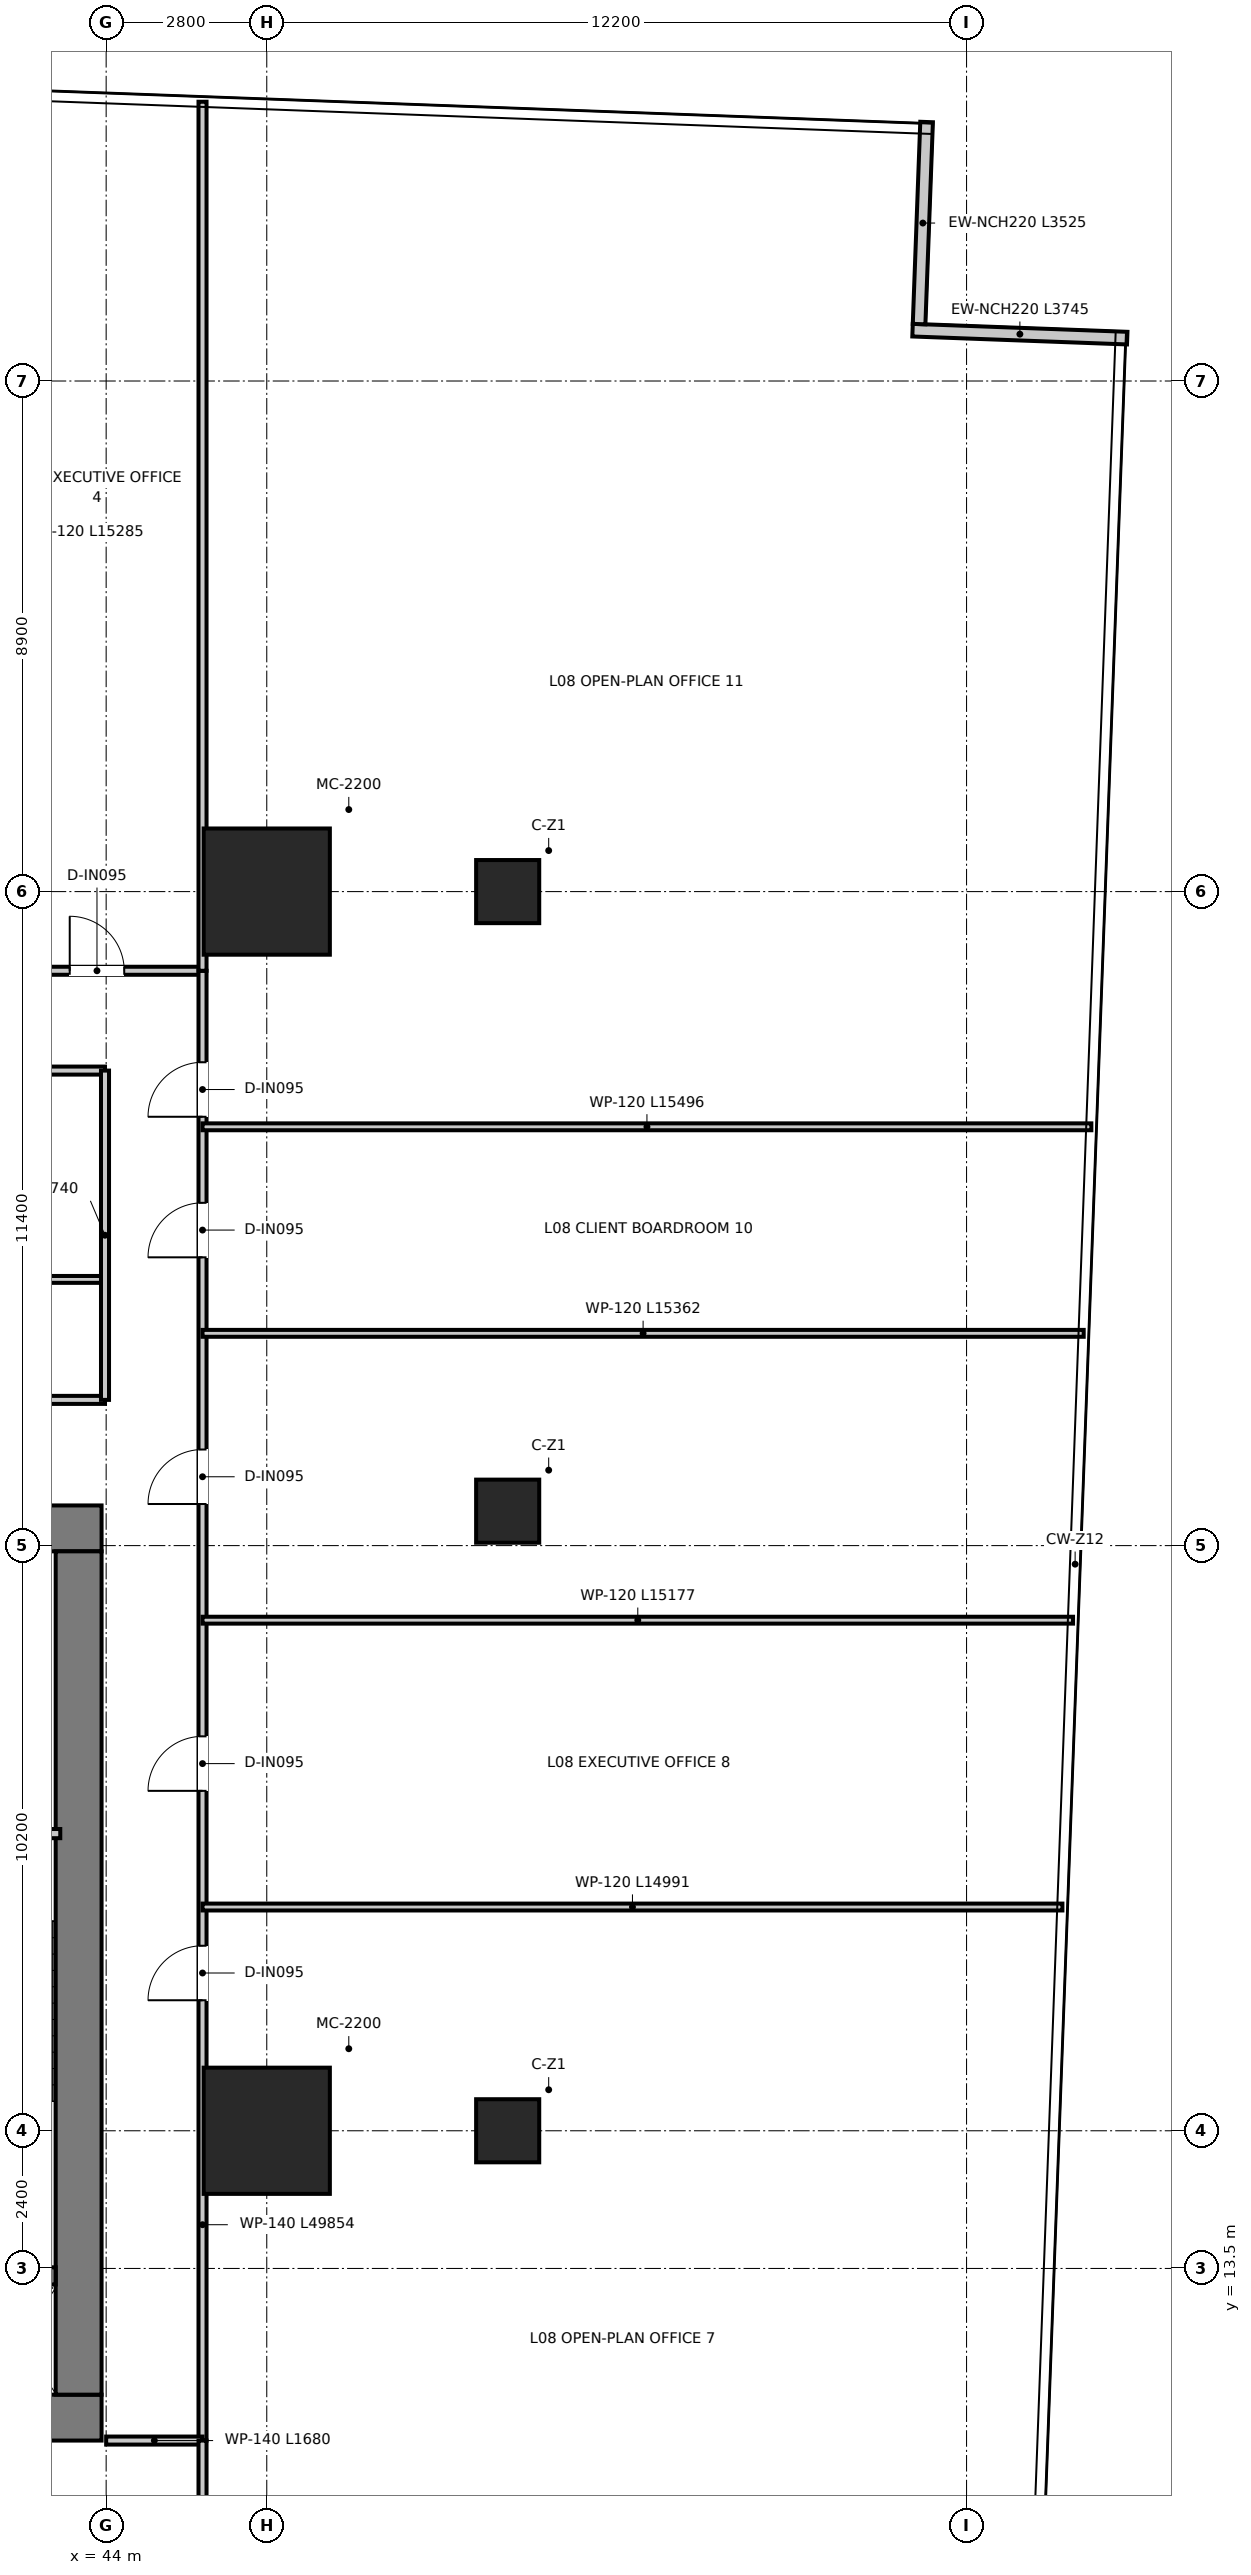
"""IFC4 building model, lengths in metres.
Left out: names, types, materials, properties, quantities, classifications, styles, units other than length and angle.
Written with IfcOpenShell. Run it as: python <this file> out.ifc"""

import sys

from ifc_helpers import new_model, si_unit, direction, frame, frame_2d, origin, origin_2d, place, context, subcontext, project, spatial, rectangle, extrude, source, transform, mapped, element, fill, save


model = new_model("IFC4")
c1 = context("Model", 3, precision=1e-05, world=origin(), true_north=direction((0.0, 1.0)))
c2 = subcontext(c1, "Body", "Model", "MODEL_VIEW")
j1 = project(units=[si_unit("LENGTHUNIT", "METRE"), si_unit("PLANEANGLEUNIT", "RADIAN")], contexts=[c1])
p1 = place(None, origin())
s1 = spatial("IfcSite", under=j1, at=p1, CompositionType="ELEMENT")
p2 = place(p1, origin())
s2 = spatial("IfcBuilding", under=s1, at=p2, CompositionType="ELEMENT")
p3 = place(p2, frame((0.0, 0.0, 36.85)))
s3 = spatial("IfcBuildingStorey", under=s2, at=p3, CompositionType="ELEMENT", Elevation=36.85)
p4 = place(p3, frame((28.08, 10.9, 0.0), z_axis=(0.0, 0.0, 1.0), x_axis=(1.0, 0.0, 0.0)))
e1 = element("IfcWall", 1, at=p4, inside=s3, PredefinedType="SHEAR", context=c2, shape_type="SweptSolid", body=[
    extrude(rectangle(XDim=15.84, YDim=0.8, at=frame_2d((7.92, 0.0))), origin(), (0.0, 0.0, 1.0), 3.95),
])
p5 = place(p3, frame((28.08, 26.4, 0.0), z_axis=(0.0, 0.0, 1.0), x_axis=(1.0, 0.0, 0.0)))
e2 = element("IfcWall", 2, at=p5, inside=s3, PredefinedType="SHEAR", context=c2, shape_type="SweptSolid", body=[
    extrude(rectangle(XDim=15.84, YDim=0.8, at=frame_2d((7.92, 0.0))), origin(), (0.0, 0.0, 1.0), 3.95),
])
p6 = place(p5, frame((7.22, 0.0, 0.0)))
e3 = element("IfcOpeningElement", 3, at=p6, cuts=e2, PredefinedType="OPENING", context=c2, shape_type="SweptSolid", body=[
    extrude(rectangle(XDim=1.4, YDim=2.2, at=frame_2d((0.7, 1.1))), frame((0.0, 0.41, 0.0), z_axis=(0.0, -1.0, 0.0), x_axis=(1.0, 0.0, 0.0)), (0.0, 0.0, 1.0), 0.82),
])
p7 = place(p5, frame((1.775, 0.0, 0.0)))
e4 = element("IfcOpeningElement", 4, at=p7, cuts=e2, PredefinedType="OPENING", context=c2, shape_type="SweptSolid", body=[
    extrude(rectangle(XDim=1.05, YDim=2.1, at=frame_2d((0.525, 1.05))), frame((0.0, 0.41, 0.0), z_axis=(0.0, -1.0, 0.0), x_axis=(1.0, 0.0, 0.0)), (0.0, 0.0, 1.0), 0.82),
])
p8 = place(p5, frame((13.015, 0.0, 0.0)))
e5 = element("IfcOpeningElement", 5, at=p8, cuts=e2, PredefinedType="OPENING", context=c2, shape_type="SweptSolid", body=[
    extrude(rectangle(XDim=1.05, YDim=2.1, at=frame_2d((0.525, 1.05))), frame((0.0, 0.41, 0.0), z_axis=(0.0, -1.0, 0.0), x_axis=(1.0, 0.0, 0.0)), (0.0, 0.0, 1.0), 0.82),
])
p9 = place(p3, frame((43.52, 11.3, 0.0), z_axis=(0.0, 0.0, 1.0), x_axis=(0.0, 1.0, 0.0)))
e6 = element("IfcWall", 6, at=p9, inside=s3, PredefinedType="SHEAR", context=c2, shape_type="SweptSolid", body=[
    extrude(rectangle(XDim=14.7, YDim=0.8, at=frame_2d((7.35, 0.0))), origin(), (0.0, 0.0, 1.0), 3.95),
])
p10 = place(p3, frame((40.02, 13.37, 0.0), z_axis=(0.0, 0.0, 1.0), x_axis=(1.0, 0.0, 0.0)))
e7 = element("IfcWall", 7, at=p10, inside=s3, PredefinedType="SHEAR", context=c2, shape_type="SweptSolid", body=[
    extrude(rectangle(XDim=3.1, YDim=0.3, at=frame_2d((1.55, 0.0))), origin(), (0.0, 0.0, 1.0), 3.95),
])
m1 = source(origin(), c2, "Body", "SweptSolid", [
    extrude(rectangle(XDim=2.2, YDim=2.2, at=origin_2d()), origin(), (0.0, 0.0, 1.0), 3.95),
])
for number, where, z_axis, x_axis in (
    (8, (46.8, 15.9, 0.0), (0.0, 0.0, 1.0), (1.0, 0.0, 0.0)),
    (9, (46.8, 37.5, 0.0), (0.0, 0.0, 1.0), (1.0, 0.0, 0.0)),
):
    element("IfcColumn", number, at=place(p3, frame(where, z_axis=z_axis, x_axis=x_axis)), inside=s3, PredefinedType="USERDEFINED", context=c2, shape_type="MappedRepresentation", body=[
        mapped(m1, transform((0.0, 0.0, 0.0), x_axis=(1.0, 0.0, 0.0), y_axis=(0.0, 1.0, 0.0), z_axis=(0.0, 0.0, 1.0), scale=1.0)),
    ])
m2 = source(origin(), c2, "Body", "SweptSolid", [
    extrude(rectangle(XDim=1.1, YDim=1.1, at=origin_2d()), origin(), (0.0, 0.0, 1.0), 3.95),
])
for number, where, z_axis, x_axis in (
    (10, (51.0, 37.5, 0.0), (0.0, 0.0, 1.0), (1.0, 0.0, 0.0)),
    (11, (51.0, 26.7, 0.0), (0.0, 0.0, 1.0), (1.0, 0.0, 0.0)),
    (12, (51.0, 15.9, 0.0), (0.0, 0.0, 1.0), (1.0, 0.0, 0.0)),
):
    element("IfcColumn", number, at=place(p3, frame(where, z_axis=z_axis, x_axis=x_axis)), inside=s3, PredefinedType="COLUMN", context=c2, shape_type="MappedRepresentation", body=[
        mapped(m2, transform((0.0, 0.0, 0.0), x_axis=(1.0, 0.0, 0.0), y_axis=(0.0, 1.0, 0.0), z_axis=(0.0, 0.0, 1.0), scale=1.0)),
    ])
p11 = place(p3, frame((61.801, 47.147, 0.0), z_axis=(0.0, 0.0, 1.0), x_axis=(-0.999314208504, 0.037028538746, 0.0)))
e13 = element("IfcWall", 13, at=p11, inside=s3, PredefinedType="ELEMENTEDWALL", context=c2, shape_type="SweptSolid", body=[
    extrude(rectangle(XDim=3.745, YDim=0.22, at=frame_2d((1.873, 0.0))), origin(), (0.0, 0.0, 1.0), 3.67),
])
p12 = place(p3, frame((58.173, 47.392, 0.0), z_axis=(0.0, 0.0, 1.0), x_axis=(0.03705521019, 0.999313219865, 0.0)))
e14 = element("IfcWall", 14, at=p12, inside=s3, PredefinedType="ELEMENTEDWALL", context=c2, shape_type="SweptSolid", body=[
    extrude(rectangle(XDim=3.525, YDim=0.22, at=frame_2d((1.762, 0.0))), origin(), (0.0, 0.0, 1.0), 3.67),
])
p13 = place(p3, frame((40.04, 21.08, 0.0), z_axis=(0.0, 0.0, 1.0), x_axis=(1.0, 0.0, 0.0)))
e15 = element("IfcWall", 15, at=p13, inside=s3, PredefinedType="PARTITIONING", context=c2, shape_type="SweptSolid", body=[
    extrude(rectangle(XDim=3.16, YDim=0.16, at=frame_2d((1.58, 0.0))), origin(), (0.0, 0.0, 1.0), 3.67),
])
p14 = place(p13, frame((1.055, 0.0, 0.0)))
e16 = element("IfcOpeningElement", 16, at=p14, cuts=e15, PredefinedType="OPENING", context=c2, shape_type="SweptSolid", body=[
    extrude(rectangle(XDim=1.05, YDim=2.1, at=frame_2d((0.525, 1.05))), frame((0.0, 0.09, 0.0), z_axis=(0.0, -1.0, 0.0), x_axis=(1.0, 0.0, 0.0)), (0.0, 0.0, 1.0), 0.18),
])
p15 = place(p3, frame((28.02, 28.64, 0.0), z_axis=(0.0, 0.0, 1.0), x_axis=(1.0, 0.0, 0.0)))
e17 = element("IfcWall", 17, at=p15, inside=s3, PredefinedType="PARTITIONING", context=c2, shape_type="SweptSolid", body=[
    extrude(rectangle(XDim=15.96, YDim=0.14, at=frame_2d((7.98, 0.0))), origin(), (0.0, 0.0, 1.0), 3.08),
])
p16 = place(p15, frame((7.455, 0.0, 0.0)))
e18 = element("IfcOpeningElement", 18, at=p16, cuts=e17, PredefinedType="OPENING", context=c2, shape_type="SweptSolid", body=[
    extrude(rectangle(XDim=1.05, YDim=2.15, at=frame_2d((0.525, 1.075))), frame((0.0, 0.08, 0.0), z_axis=(0.0, -1.0, 0.0), x_axis=(1.0, 0.0, 0.0)), (0.0, 0.0, 1.0), 0.16),
])
p17 = place(p3, frame((28.02, 30.74, 0.0), z_axis=(0.0, 0.0, 1.0), x_axis=(1.0, 0.0, 0.0)))
e19 = element("IfcWall", 19, at=p17, inside=s3, PredefinedType="PARTITIONING", context=c2, shape_type="SweptSolid", body=[
    extrude(rectangle(XDim=15.96, YDim=0.12, at=frame_2d((7.98, 0.0))), origin(), (0.0, 0.0, 1.0), 3.08),
])
p18 = place(p3, frame((28.02, 34.38, 0.0), z_axis=(0.0, 0.0, 1.0), x_axis=(1.0, 0.0, 0.0)))
e20 = element("IfcWall", 20, at=p18, inside=s3, PredefinedType="PARTITIONING", context=c2, shape_type="SweptSolid", body=[
    extrude(rectangle(XDim=15.96, YDim=0.14, at=frame_2d((7.98, 0.0))), origin(), (0.0, 0.0, 1.0), 3.08),
])
p19 = place(p18, frame((7.83, 0.0, 0.0)))
e21 = element("IfcOpeningElement", 21, at=p19, cuts=e20, PredefinedType="OPENING", context=c2, shape_type="SweptSolid", body=[
    extrude(rectangle(XDim=0.9, YDim=2.1, at=frame_2d((0.45, 1.05))), frame((0.0, 0.08, 0.0), z_axis=(0.0, -1.0, 0.0), x_axis=(1.0, 0.0, 0.0)), (0.0, 0.0, 1.0), 0.16),
])
p20 = place(p18, frame((11.03, 0.0, 0.0)))
e22 = element("IfcOpeningElement", 22, at=p20, cuts=e20, PredefinedType="OPENING", context=c2, shape_type="SweptSolid", body=[
    extrude(rectangle(XDim=0.9, YDim=2.1, at=frame_2d((0.45, 1.05))), frame((0.0, 0.08, 0.0), z_axis=(0.0, -1.0, 0.0), x_axis=(1.0, 0.0, 0.0)), (0.0, 0.0, 1.0), 0.16),
])
p21 = place(p18, frame((14.055, 0.0, 0.0)))
e23 = element("IfcOpeningElement", 23, at=p21, cuts=e20, PredefinedType="OPENING", context=c2, shape_type="SweptSolid", body=[
    extrude(rectangle(XDim=0.95, YDim=2.1, at=frame_2d((0.475, 1.05))), frame((0.0, 0.08, 0.0), z_axis=(0.0, -1.0, 0.0), x_axis=(1.0, 0.0, 0.0)), (0.0, 0.0, 1.0), 0.16),
])
p22 = place(p18, frame((2.855, 0.0, 0.0)))
e24 = element("IfcOpeningElement", 24, at=p22, cuts=e20, PredefinedType="OPENING", context=c2, shape_type="SweptSolid", body=[
    extrude(rectangle(XDim=0.95, YDim=2.1, at=frame_2d((0.475, 1.05))), frame((0.0, 0.08, 0.0), z_axis=(0.0, -1.0, 0.0), x_axis=(1.0, 0.0, 0.0)), (0.0, 0.0, 1.0), 0.16),
])
p23 = place(p3, frame((43.98, 28.64, 0.0), z_axis=(0.0, 0.0, 1.0), x_axis=(0.0, 1.0, 0.0)))
e25 = element("IfcWall", 25, at=p23, inside=s3, PredefinedType="PARTITIONING", context=c2, shape_type="SweptSolid", body=[
    extrude(rectangle(XDim=5.74, YDim=0.14, at=frame_2d((2.87, 0.0))), origin(), (0.0, 0.0, 1.0), 3.22),
])
p24 = place(p3, frame((26.32, 36.12, 0.0), z_axis=(0.0, 0.0, 1.0), x_axis=(1.0, 0.0, 0.0)))
e26 = element("IfcWall", 26, at=p24, inside=s3, PredefinedType="PARTITIONING", context=c2, shape_type="SweptSolid", body=[
    extrude(rectangle(XDim=19.36, YDim=0.14, at=frame_2d((9.68, 0.0))), origin(), (0.0, 0.0, 1.0), 3.08),
])
p25 = place(p24, frame((1.365, 0.0, 0.0)))
e27 = element("IfcOpeningElement", 27, at=p25, cuts=e26, PredefinedType="OPENING", context=c2, shape_type="SweptSolid", body=[
    extrude(rectangle(XDim=0.95, YDim=2.1, at=frame_2d((0.475, 1.05))), frame((0.0, 0.08, 0.0), z_axis=(0.0, -1.0, 0.0), x_axis=(1.0, 0.0, 0.0)), (0.0, 0.0, 1.0), 0.16),
])
p26 = place(p24, frame((6.205, 0.0, 0.0)))
e28 = element("IfcOpeningElement", 28, at=p26, cuts=e26, PredefinedType="OPENING", context=c2, shape_type="SweptSolid", body=[
    extrude(rectangle(XDim=0.95, YDim=2.1, at=frame_2d((0.475, 1.05))), frame((0.0, 0.08, 0.0), z_axis=(0.0, -1.0, 0.0), x_axis=(1.0, 0.0, 0.0)), (0.0, 0.0, 1.0), 0.16),
])
p27 = place(p24, frame((12.205, 0.0, 0.0)))
e29 = element("IfcOpeningElement", 29, at=p27, cuts=e26, PredefinedType="OPENING", context=c2, shape_type="SweptSolid", body=[
    extrude(rectangle(XDim=0.95, YDim=2.1, at=frame_2d((0.475, 1.05))), frame((0.0, 0.08, 0.0), z_axis=(0.0, -1.0, 0.0), x_axis=(1.0, 0.0, 0.0)), (0.0, 0.0, 1.0), 0.16),
])
p28 = place(p24, frame((17.045, 0.0, 0.0)))
e30 = element("IfcOpeningElement", 30, at=p28, cuts=e26, PredefinedType="OPENING", context=c2, shape_type="SweptSolid", body=[
    extrude(rectangle(XDim=0.95, YDim=2.1, at=frame_2d((0.475, 1.05))), frame((0.0, 0.08, 0.0), z_axis=(0.0, -1.0, 0.0), x_axis=(1.0, 0.0, 0.0)), (0.0, 0.0, 1.0), 0.16),
])
p29 = place(p3, frame((45.68, 10.5, 0.0), z_axis=(0.0, 0.0, 1.0), x_axis=(0.0, 1.0, 0.0)))
e31 = element("IfcWall", 31, at=p29, inside=s3, PredefinedType="PARTITIONING", context=c2, shape_type="SweptSolid", body=[
    extrude(rectangle(XDim=25.62, YDim=0.14, at=frame_2d((12.81, 0.0))), origin(), (0.0, 0.0, 1.0), 2.97),
])
p30 = place(p29, frame((7.675, 0.0, 0.0)))
e32 = element("IfcOpeningElement", 32, at=p30, cuts=e31, PredefinedType="OPENING", context=c2, shape_type="SweptSolid", body=[
    extrude(rectangle(XDim=0.95, YDim=2.1, at=frame_2d((0.475, 1.05))), frame((0.0, 0.08, 0.0), z_axis=(0.0, -1.0, 0.0), x_axis=(1.0, 0.0, 0.0)), (0.0, 0.0, 1.0), 0.16),
])
p31 = place(p29, frame((11.325, 0.0, 0.0)))
e33 = element("IfcOpeningElement", 33, at=p31, cuts=e31, PredefinedType="OPENING", context=c2, shape_type="SweptSolid", body=[
    extrude(rectangle(XDim=0.95, YDim=2.1, at=frame_2d((0.475, 1.05))), frame((0.0, 0.08, 0.0), z_axis=(0.0, -1.0, 0.0), x_axis=(1.0, 0.0, 0.0)), (0.0, 0.0, 1.0), 0.16),
])
p32 = place(p29, frame((16.325, 0.0, 0.0)))
e34 = element("IfcOpeningElement", 34, at=p32, cuts=e31, PredefinedType="OPENING", context=c2, shape_type="SweptSolid", body=[
    extrude(rectangle(XDim=0.95, YDim=2.1, at=frame_2d((0.475, 1.05))), frame((0.0, 0.08, 0.0), z_axis=(0.0, -1.0, 0.0), x_axis=(1.0, 0.0, 0.0)), (0.0, 0.0, 1.0), 0.16),
])
p33 = place(p29, frame((20.625, 0.0, 0.0)))
e35 = element("IfcOpeningElement", 35, at=p33, cuts=e31, PredefinedType="OPENING", context=c2, shape_type="SweptSolid", body=[
    extrude(rectangle(XDim=0.95, YDim=2.1, at=frame_2d((0.475, 1.05))), frame((0.0, 0.08, 0.0), z_axis=(0.0, -1.0, 0.0), x_axis=(1.0, 0.0, 0.0)), (0.0, 0.0, 1.0), 0.16),
])
p34 = place(p29, frame((23.075, 0.0, 0.0)))
e36 = element("IfcOpeningElement", 36, at=p34, cuts=e31, PredefinedType="OPENING", context=c2, shape_type="SweptSolid", body=[
    extrude(rectangle(XDim=0.95, YDim=2.1, at=frame_2d((0.475, 1.05))), frame((0.0, 0.08, 0.0), z_axis=(0.0, -1.0, 0.0), x_axis=(1.0, 0.0, 0.0)), (0.0, 0.0, 1.0), 0.16),
])
p35 = place(p3, frame((44.0, 10.5, 0.0), z_axis=(0.0, 0.0, 1.0), x_axis=(1.0, 0.0, 0.0)))
e37 = element("IfcWall", 37, at=p35, inside=s3, PredefinedType="PARTITIONING", context=c2, shape_type="SweptSolid", body=[
    extrude(rectangle(XDim=1.68, YDim=0.14, at=frame_2d((0.84, 0.0))), origin(), (0.0, 0.0, 1.0), 3.67),
])
p36 = place(p3, frame((45.68, 36.12, 0.0), z_axis=(0.0, 0.0, 1.0), x_axis=(0.0, 1.0, 0.0)))
e38 = element("IfcWall", 38, at=p36, inside=s3, PredefinedType="PARTITIONING", context=c2, shape_type="SweptSolid", body=[
    extrude(rectangle(XDim=15.148, YDim=0.14, at=frame_2d((7.574, 0.0))), origin(), (0.0, 0.0, 1.0), 2.97),
])
p37 = place(p3, frame((45.68, 1.414, 0.0), z_axis=(0.0, 0.0, 1.0), x_axis=(0.0, 1.0, 0.0)))
e39 = element("IfcWall", 39, at=p37, inside=s3, PredefinedType="PARTITIONING", context=c2, shape_type="SweptSolid", body=[
    extrude(rectangle(XDim=9.086, YDim=0.14, at=frame_2d((4.543, 0.0))), origin(), (0.0, 0.0, 1.0), 3.67),
])
p38 = place(p3, frame((45.68, 19.8, 0.0), z_axis=(0.0, 0.0, 1.0), x_axis=(1.0, 0.0, 0.0)))
e40 = element("IfcWall", 40, at=p38, inside=s3, PredefinedType="PARTITIONING", context=c2, shape_type="SweptSolid", body=[
    extrude(rectangle(XDim=14.991, YDim=0.12, at=frame_2d((7.496, 0.0))), origin(), (0.0, 0.0, 1.0), 2.97),
])
p39 = place(p3, frame((45.68, 24.8, 0.0), z_axis=(0.0, 0.0, 1.0), x_axis=(1.0, 0.0, 0.0)))
e41 = element("IfcWall", 41, at=p39, inside=s3, PredefinedType="PARTITIONING", context=c2, shape_type="SweptSolid", body=[
    extrude(rectangle(XDim=15.177, YDim=0.12, at=frame_2d((7.588, 0.0))), origin(), (0.0, 0.0, 1.0), 2.97),
])
p40 = place(p3, frame((45.68, 29.8, 0.0), z_axis=(0.0, 0.0, 1.0), x_axis=(1.0, 0.0, 0.0)))
e42 = element("IfcWall", 42, at=p40, inside=s3, PredefinedType="PARTITIONING", context=c2, shape_type="SweptSolid", body=[
    extrude(rectangle(XDim=15.362, YDim=0.12, at=frame_2d((7.681, 0.0))), origin(), (0.0, 0.0, 1.0), 2.97),
])
p41 = place(p3, frame((45.68, 33.4, 0.0), z_axis=(0.0, 0.0, 1.0), x_axis=(1.0, 0.0, 0.0)))
e43 = element("IfcWall", 43, at=p41, inside=s3, PredefinedType="PARTITIONING", context=c2, shape_type="SweptSolid", body=[
    extrude(rectangle(XDim=15.496, YDim=0.12, at=frame_2d((7.748, 0.0))), origin(), (0.0, 0.0, 1.0), 2.97),
])
p42 = place(p28, origin())
e44 = element("IfcDoor", 44, at=p42, inside=s3, OperationType="SINGLE_SWING_LEFT", PredefinedType="DOOR", context=c2, shape_type="SweptSolid", body=[
    extrude(rectangle(XDim=0.95, YDim=2.1, at=frame_2d((0.475, 1.05))), frame((0.0, 0.025, 0.0), z_axis=(0.0, -1.0, 0.0), x_axis=(1.0, 0.0, 0.0)), (0.0, 0.0, 1.0), 0.05),
])
fill(e30, e44)
p43 = place(p30, origin())
e45 = element("IfcDoor", 45, at=p43, inside=s3, OperationType="SINGLE_SWING_LEFT", PredefinedType="DOOR", context=c2, shape_type="SweptSolid", body=[
    extrude(rectangle(XDim=0.95, YDim=2.1, at=frame_2d((0.475, 1.05))), frame((0.0, 0.025, 0.0), z_axis=(0.0, -1.0, 0.0), x_axis=(1.0, 0.0, 0.0)), (0.0, 0.0, 1.0), 0.05),
])
fill(e32, e45)
p44 = place(p31, origin())
e46 = element("IfcDoor", 46, at=p44, inside=s3, OperationType="SINGLE_SWING_LEFT", PredefinedType="DOOR", context=c2, shape_type="SweptSolid", body=[
    extrude(rectangle(XDim=0.95, YDim=2.1, at=frame_2d((0.475, 1.05))), frame((0.0, 0.025, 0.0), z_axis=(0.0, -1.0, 0.0), x_axis=(1.0, 0.0, 0.0)), (0.0, 0.0, 1.0), 0.05),
])
fill(e33, e46)
p45 = place(p32, origin())
e47 = element("IfcDoor", 47, at=p45, inside=s3, OperationType="SINGLE_SWING_LEFT", PredefinedType="DOOR", context=c2, shape_type="SweptSolid", body=[
    extrude(rectangle(XDim=0.95, YDim=2.1, at=frame_2d((0.475, 1.05))), frame((0.0, 0.025, 0.0), z_axis=(0.0, -1.0, 0.0), x_axis=(1.0, 0.0, 0.0)), (0.0, 0.0, 1.0), 0.05),
])
fill(e34, e47)
p46 = place(p33, origin())
e48 = element("IfcDoor", 48, at=p46, inside=s3, OperationType="SINGLE_SWING_LEFT", PredefinedType="DOOR", context=c2, shape_type="SweptSolid", body=[
    extrude(rectangle(XDim=0.95, YDim=2.1, at=frame_2d((0.475, 1.05))), frame((0.0, 0.025, 0.0), z_axis=(0.0, -1.0, 0.0), x_axis=(1.0, 0.0, 0.0)), (0.0, 0.0, 1.0), 0.05),
])
fill(e35, e48)
p47 = place(p34, origin())
e49 = element("IfcDoor", 49, at=p47, inside=s3, OperationType="SINGLE_SWING_LEFT", PredefinedType="DOOR", context=c2, shape_type="SweptSolid", body=[
    extrude(rectangle(XDim=0.95, YDim=2.1, at=frame_2d((0.475, 1.05))), frame((0.0, 0.025, 0.0), z_axis=(0.0, -1.0, 0.0), x_axis=(1.0, 0.0, 0.0)), (0.0, 0.0, 1.0), 0.05),
])
fill(e36, e49)
save(model, sys.argv[1])
